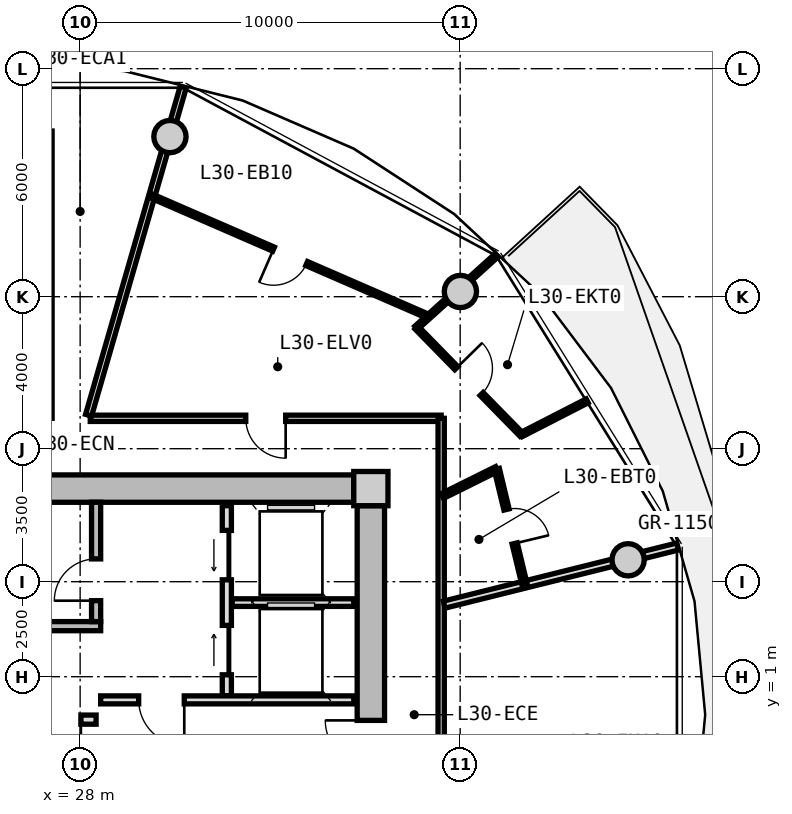
"""IFC4 building model, lengths in metres.
Left out: names, types, materials, properties, quantities, classifications, styles, units other than length and angle.
Written with IfcOpenShell. Run it as: python <this file> out.ifc"""

import sys

from ifc_helpers import new_model, si_unit, direction, frame, frame_2d, origin, origin_2d, place, context, subcontext, project, spatial, rectangle, circle, extrude, source, transform, mapped, element, fill, save


model = new_model("IFC4")
c1 = context("Model", 3, precision=1e-05, world=origin(), true_north=direction((0.0, 1.0)))
c2 = subcontext(c1, "Body", "Model", "MODEL_VIEW")
j1 = project(units=[si_unit("LENGTHUNIT", "METRE"), si_unit("PLANEANGLEUNIT", "RADIAN")], contexts=[c1])
p1 = place(None, origin())
s1 = spatial("IfcSite", under=j1, at=p1, CompositionType="ELEMENT")
p2 = place(p1, origin())
s2 = spatial("IfcBuilding", under=s1, at=p2, CompositionType="ELEMENT")
p3 = place(p2, frame((0.0, 0.0, 99.3)))
s3 = spatial("IfcBuildingStorey", under=s2, at=p3, CompositionType="ELEMENT", Elevation=99.3)
m1 = source(origin(), c2, "Body", "SweptSolid", [
    extrude(rectangle(XDim=0.9, YDim=0.9, at=origin_2d()), origin(), (0.0, 0.0, 1.0), 3.05),
])
p4 = place(p3, frame((35.65, 5.95, 0.0), z_axis=(0.0, 0.0, 1.0), x_axis=(1.0, 0.0, 0.0)))
e1 = element("IfcColumn", 1, at=p4, inside=s3, PredefinedType="COLUMN", context=c2, shape_type="MappedRepresentation", body=[
    mapped(m1, transform((0.0, 0.0, 0.0), x_axis=(1.0, 0.0, 0.0), y_axis=(0.0, 1.0, 0.0), z_axis=(0.0, 0.0, 1.0), scale=1.0)),
])
m2 = source(origin(), c2, "Body", "SweptSolid", [
    extrude(rectangle(XDim=14.4, YDim=0.72, at=frame_2d((7.2, 0.0))), origin(), (0.0, 0.0, 1.0), 2.79),
])
p5 = place(p3, frame((20.8, 5.95, 0.0), z_axis=(0.0, 0.0, 1.0), x_axis=(1.0, 0.0, 0.0)))
e2 = element("IfcWall", 2, at=p5, inside=s3, PredefinedType="SHEAR", context=c2, shape_type="MappedRepresentation", body=[
    mapped(m2, transform((0.0, 0.0, 0.0), x_axis=(1.0, 0.0, 0.0), y_axis=(0.0, 1.0, 0.0), z_axis=(0.0, 0.0, 1.0), scale=1.0)),
])
m3 = source(origin(), c2, "Body", "SweptSolid", [
    extrude(rectangle(XDim=11.0, YDim=0.72, at=frame_2d((5.5, 0.0))), origin(), (0.0, 0.0, 1.0), 2.79),
])
p6 = place(p3, frame((35.65, 5.5, 0.0), z_axis=(0.0, 0.0, 1.0), x_axis=(0.0, -1.0, 0.0)))
e3 = element("IfcWall", 3, at=p6, inside=s3, PredefinedType="SHEAR", context=c2, shape_type="MappedRepresentation", body=[
    mapped(m3, transform((0.0, 0.0, 0.0), x_axis=(1.0, 0.0, 0.0), y_axis=(0.0, 1.0, 0.0), z_axis=(0.0, 0.0, 1.0), scale=1.0)),
])
p7 = place(p6, frame((5.65, 0.0, 0.0)))
e4 = element("IfcOpeningElement", 4, at=p7, cuts=e3, PredefinedType="OPENING", context=c2, shape_type="SweptSolid", body=[
    extrude(rectangle(XDim=1.2, YDim=2.15, at=frame_2d((0.6, 1.075))), frame((0.0, 0.37, 0.0), z_axis=(0.0, -1.0, 0.0), x_axis=(1.0, 0.0, 0.0)), (0.0, 0.0, 1.0), 0.74),
])
m4 = source(origin(), c2, "Body", "SweptSolid", [
    extrude(circle(Radius=0.425, at=origin_2d()), origin(), (0.0, 0.0, 1.0), 3.05),
])
for number, where, z_axis, x_axis in (
    (5, (42.419, 4.076, 0.0), (0.0, 0.0, 1.0), (1.0, 0.0, 0.0)),
    (6, (38.006, 11.137, 0.0), (0.0, 0.0, 1.0), (1.0, 0.0, 0.0)),
    (7, (30.363, 15.213, 0.0), (0.0, 0.0, 1.0), (1.0, 0.0, 0.0)),
):
    element("IfcColumn", number, at=place(p3, frame(where, z_axis=z_axis, x_axis=x_axis)), inside=s3, PredefinedType="COLUMN", context=c2, shape_type="MappedRepresentation", body=[
        mapped(m4, transform((0.0, 0.0, 0.0), x_axis=(1.0, 0.0, 0.0), y_axis=(0.0, 1.0, 0.0), z_axis=(0.0, 0.0, 1.0), scale=1.0)),
    ])
m5 = source(origin(), c2, "Body", "SweptSolid", [
    extrude(rectangle(XDim=7.83, YDim=0.24, at=frame_2d((3.915, 0.0))), origin(), (0.0, 0.0, 1.0), 2.79),
])
p8 = place(p3, frame((20.71, 2.33, 0.0), z_axis=(0.0, 0.0, 1.0), x_axis=(1.0, 0.0, 0.0)))
e8 = element("IfcWall", 8, at=p8, inside=s3, PredefinedType="PARTITIONING", context=c2, shape_type="MappedRepresentation", body=[
    mapped(m5, transform((0.0, 0.0, 0.0), x_axis=(1.0, 0.0, 0.0), y_axis=(0.0, 1.0, 0.0), z_axis=(0.0, 0.0, 1.0), scale=1.0)),
])
m6 = source(origin(), c2, "Body", "SweptSolid", [
    extrude(rectangle(XDim=3.14, YDim=0.24, at=frame_2d((1.57, 0.0))), origin(), (0.0, 0.0, 1.0), 2.79),
])
p9 = place(p3, frame((28.42, 2.45, 0.0), z_axis=(0.0, 0.0, 1.0), x_axis=(0.0, 1.0, 0.0)))
e9 = element("IfcWall", 9, at=p9, inside=s3, PredefinedType="PARTITIONING", context=c2, shape_type="MappedRepresentation", body=[
    mapped(m6, transform((0.0, 0.0, 0.0), x_axis=(1.0, 0.0, 0.0), y_axis=(0.0, 1.0, 0.0), z_axis=(0.0, 0.0, 1.0), scale=1.0)),
])
p10 = place(p9, frame((0.55, 0.0, 0.0)))
e10 = element("IfcOpeningElement", 10, at=p10, cuts=e9, PredefinedType="OPENING", context=c2, shape_type="SweptSolid", body=[
    extrude(rectangle(XDim=1.1, YDim=2.15, at=frame_2d((0.55, 1.075))), frame((0.0, 0.13, 0.0), z_axis=(0.0, -1.0, 0.0), x_axis=(1.0, 0.0, 0.0)), (0.0, 0.0, 1.0), 0.26),
])
m7 = source(origin(), c2, "Body", "SweptSolid", [
    extrude(rectangle(XDim=5.0, YDim=0.24, at=frame_2d((2.5, 0.0))), origin(), (0.0, 0.0, 1.0), 2.775),
])
p11 = place(p3, frame((31.86, 0.5, 0.0), z_axis=(0.0, 0.0, 1.0), x_axis=(0.0, 1.0, 0.0)))
e11 = element("IfcWall", 11, at=p11, inside=s3, PredefinedType="PARTITIONING", context=c2, shape_type="MappedRepresentation", body=[
    mapped(m7, transform((0.0, 0.0, 0.0), x_axis=(1.0, 0.0, 0.0), y_axis=(0.0, 1.0, 0.0), z_axis=(0.0, 0.0, 1.0), scale=1.0)),
])
p12 = place(p11, frame((3.05, 0.0, 0.0)))
e12 = element("IfcOpeningElement", 12, at=p12, cuts=e11, PredefinedType="OPENING", context=c2, shape_type="SweptSolid", body=[
    extrude(rectangle(XDim=1.3, YDim=2.2, at=frame_2d((0.65, 1.1))), frame((0.0, 0.13, 0.0), z_axis=(0.0, -1.0, 0.0), x_axis=(1.0, 0.0, 0.0)), (0.0, 0.0, 1.0), 0.26),
])
p13 = place(p11, frame((0.55, 0.0, 0.0)))
e13 = element("IfcOpeningElement", 13, at=p13, cuts=e11, PredefinedType="OPENING", context=c2, shape_type="SweptSolid", body=[
    extrude(rectangle(XDim=1.3, YDim=2.2, at=frame_2d((0.65, 1.1))), frame((0.0, 0.13, 0.0), z_axis=(0.0, -1.0, 0.0), x_axis=(1.0, 0.0, 0.0)), (0.0, 0.0, 1.0), 0.26),
])
m8 = source(origin(), c2, "Body", "SweptSolid", [
    extrude(rectangle(XDim=3.2, YDim=0.2, at=frame_2d((1.6, 0.0))), origin(), (0.0, 0.0, 1.0), 2.775),
])
p14 = place(p3, frame((32.0, 2.95, 0.0), z_axis=(0.0, 0.0, 1.0), x_axis=(1.0, 0.0, 0.0)))
e14 = element("IfcWall", 14, at=p14, inside=s3, PredefinedType="PARTITIONING", context=c2, shape_type="MappedRepresentation", body=[
    mapped(m8, transform((0.0, 0.0, 0.0), x_axis=(1.0, 0.0, 0.0), y_axis=(0.0, 1.0, 0.0), z_axis=(0.0, 0.0, 1.0), scale=1.0)),
])
m9 = source(origin(), c2, "Body", "SweptSolid", [
    extrude(rectangle(XDim=6.66, YDim=0.21, at=frame_2d((3.33, 0.0))), origin(), (0.0, 0.0, 1.0), 2.775),
])
p15 = place(p3, frame((28.54, 0.39, 0.0), z_axis=(0.0, 0.0, 1.0), x_axis=(1.0, 0.0, 0.0)))
e15 = element("IfcWall", 15, at=p15, inside=s3, PredefinedType="PARTITIONING", context=c2, shape_type="MappedRepresentation", body=[
    mapped(m9, transform((0.0, 0.0, 0.0), x_axis=(1.0, 0.0, 0.0), y_axis=(0.0, 1.0, 0.0), z_axis=(0.0, 0.0, 1.0), scale=1.0)),
])
p16 = place(p15, frame((1.0, 0.0, 0.0)))
e16 = element("IfcOpeningElement", 16, at=p16, cuts=e15, PredefinedType="OPENING", context=c2, shape_type="SweptSolid", body=[
    extrude(rectangle(XDim=1.2, YDim=2.15, at=frame_2d((0.6, 1.075))), frame((0.0, 0.115, 0.0), z_axis=(0.0, -1.0, 0.0), x_axis=(1.0, 0.0, 0.0)), (0.0, 0.0, 1.0), 0.23),
])
m10 = source(origin(), c2, "Body", "SweptSolid", [
    extrude(rectangle(XDim=7.62, YDim=0.24, at=frame_2d((3.81, 0.0))), origin(), (0.0, 0.0, 1.0), 2.775),
])
p17 = place(p3, frame((20.8, -0.13, 0.0), z_axis=(0.0, 0.0, 1.0), x_axis=(1.0, 0.0, 0.0)))
e17 = element("IfcWall", 17, at=p17, inside=s3, PredefinedType="PARTITIONING", context=c2, shape_type="MappedRepresentation", body=[
    mapped(m10, transform((0.0, 0.0, 0.0), x_axis=(1.0, 0.0, 0.0), y_axis=(0.0, 1.0, 0.0), z_axis=(0.0, 0.0, 1.0), scale=1.0)),
])
p18 = place(p17, frame((6.22, 0.0, 0.0)))
e18 = element("IfcOpeningElement", 18, at=p18, cuts=e17, PredefinedType="OPENING", context=c2, shape_type="SweptSolid", body=[
    extrude(rectangle(XDim=1.0, YDim=2.1, at=frame_2d((0.5, 1.05))), frame((0.0, 0.13, 0.0), z_axis=(0.0, -1.0, 0.0), x_axis=(1.0, 0.0, 0.0)), (0.0, 0.0, 1.0), 0.26),
])
p19 = place(p17, frame((2.4, 0.0, 0.0)))
e19 = element("IfcOpeningElement", 19, at=p19, cuts=e17, PredefinedType="OPENING", context=c2, shape_type="SweptSolid", body=[
    extrude(rectangle(XDim=1.0, YDim=2.1, at=frame_2d((0.5, 1.05))), frame((0.0, 0.13, 0.0), z_axis=(0.0, -1.0, 0.0), x_axis=(1.0, 0.0, 0.0)), (0.0, 0.0, 1.0), 0.26),
])
m11 = source(origin(), c2, "Body", "SweptSolid", [
    extrude(rectangle(XDim=9.234, YDim=0.165, at=frame_2d((4.617, 0.0))), origin(), (0.0, 0.0, 1.0), 2.775),
])
p20 = place(p3, frame((28.266, 7.8, 0.0), z_axis=(0.0, 0.0, 1.0), x_axis=(1.0, 0.0, 0.0)))
e20 = element("IfcWall", 20, at=p20, inside=s3, PredefinedType="PARTITIONING", context=c2, shape_type="MappedRepresentation", body=[
    mapped(m11, transform((0.0, 0.0, 0.0), x_axis=(1.0, 0.0, 0.0), y_axis=(0.0, 1.0, 0.0), z_axis=(0.0, 0.0, 1.0), scale=1.0)),
])
p21 = place(p20, frame((4.092, 0.0, 0.0)))
e21 = element("IfcOpeningElement", 21, at=p21, cuts=e20, PredefinedType="OPENING", context=c2, shape_type="SweptSolid", body=[
    extrude(rectangle(XDim=1.05, YDim=2.15, at=frame_2d((0.525, 1.075))), frame((0.0, 0.093, 0.0), z_axis=(0.0, -1.0, 0.0), x_axis=(1.0, 0.0, 0.0)), (0.0, 0.0, 1.0), 0.185),
])
m12 = source(origin(), c2, "Body", "SweptSolid", [
    extrude(rectangle(XDim=15.6, YDim=0.165, at=frame_2d((7.8, 0.0))), origin(), (0.0, 0.0, 1.0), 2.775),
])
p22 = place(p3, frame((37.5, 7.8, 0.0), z_axis=(0.0, 0.0, 1.0), x_axis=(0.0, -1.0, 0.0)))
e22 = element("IfcWall", 22, at=p22, inside=s3, PredefinedType="PARTITIONING", context=c2, shape_type="MappedRepresentation", body=[
    mapped(m12, transform((0.0, 0.0, 0.0), x_axis=(1.0, 0.0, 0.0), y_axis=(0.0, 1.0, 0.0), z_axis=(0.0, 0.0, 1.0), scale=1.0)),
])
p23 = place(p22, frame((9.482, 0.0, 0.0)))
e23 = element("IfcOpeningElement", 23, at=p23, cuts=e22, PredefinedType="OPENING", context=c2, shape_type="SweptSolid", body=[
    extrude(rectangle(XDim=1.25, YDim=2.2, at=frame_2d((0.625, 1.1))), frame((0.0, 0.093, 0.0), z_axis=(0.0, -1.0, 0.0), x_axis=(1.0, 0.0, 0.0)), (0.0, 0.0, 1.0), 0.185),
])
m13 = source(origin(), c2, "Body", "SweptSolid", [
    extrude(rectangle(XDim=8.989, YDim=0.165, at=frame_2d((4.495, 0.0))), origin(), (0.0, 0.0, 1.0), 2.275),
])
p24 = place(p3, frame((28.222, 7.88, 0.0), z_axis=(0.0, 0.0, 1.0), x_axis=(0.27702323008, 0.960863221274, 0.0)))
e24 = element("IfcWall", 24, at=p24, inside=s3, PredefinedType="PARTITIONING", context=c2, shape_type="MappedRepresentation", body=[
    mapped(m13, transform((0.0, 0.0, 0.0), x_axis=(1.0, 0.0, 0.0), y_axis=(0.0, 1.0, 0.0), z_axis=(0.0, 0.0, 1.0), scale=1.0)),
])
m14 = source(origin(), c2, "Body", "SweptSolid", [
    extrude(rectangle(XDim=6.331, YDim=0.19, at=frame_2d((3.165, 0.0))), origin(), (0.0, 0.0, 1.0), 2.275),
])
p25 = place(p3, frame((37.58, 2.896, 0.0), z_axis=(0.0, 0.0, 1.0), x_axis=(0.97036440661, 0.241646267062, 0.0)))
e25 = element("IfcWall", 25, at=p25, inside=s3, PredefinedType="PARTITIONING", context=c2, shape_type="MappedRepresentation", body=[
    mapped(m14, transform((0.0, 0.0, 0.0), x_axis=(1.0, 0.0, 0.0), y_axis=(0.0, 1.0, 0.0), z_axis=(0.0, 0.0, 1.0), scale=1.0)),
])
m15 = source(origin(), c2, "Body", "SweptSolid", [
    extrude(rectangle(XDim=7.938, YDim=0.115, at=frame_2d((3.969, 0.0))), origin(), (0.0, 0.0, 1.0), 2.775),
])
p26 = place(p3, frame((37.164, 10.479, 0.0), z_axis=(0.0, 0.0, 1.0), x_axis=(-0.917052940979, 0.398765474235, 0.0)))
e26 = element("IfcWall", 26, at=p26, inside=s3, PredefinedType="PARTITIONING", context=c2, shape_type="MappedRepresentation", body=[
    mapped(m15, transform((0.0, 0.0, 0.0), x_axis=(1.0, 0.0, 0.0), y_axis=(0.0, 1.0, 0.0), z_axis=(0.0, 0.0, 1.0), scale=1.0)),
])
p27 = place(p26, frame((3.494, 0.0, 0.0)))
e27 = element("IfcOpeningElement", 27, at=p27, cuts=e26, PredefinedType="OPENING", context=c2, shape_type="SweptSolid", body=[
    extrude(rectangle(XDim=0.95, YDim=2.1, at=frame_2d((0.475, 1.05))), frame((0.0, 0.067, 0.0), z_axis=(0.0, -1.0, 0.0), x_axis=(1.0, 0.0, 0.0)), (0.0, 0.0, 1.0), 0.135),
])
m16 = source(origin(), c2, "Body", "SweptSolid", [
    extrude(rectangle(XDim=2.852, YDim=0.115, at=frame_2d((1.426, 0.0))), origin(), (0.0, 0.0, 1.0), 2.275),
])
p28 = place(p3, frame((36.844, 10.18, 0.0), z_axis=(0.0, 0.0, 1.0), x_axis=(0.742190556634, 0.670188911908, 0.0)))
e28 = element("IfcWall", 28, at=p28, inside=s3, PredefinedType="PARTITIONING", context=c2, shape_type="MappedRepresentation", body=[
    mapped(m16, transform((0.0, 0.0, 0.0), x_axis=(1.0, 0.0, 0.0), y_axis=(0.0, 1.0, 0.0), z_axis=(0.0, 0.0, 1.0), scale=1.0)),
])
m17 = source(origin(), c2, "Body", "SweptSolid", [
    extrude(rectangle(XDim=1.6, YDim=0.14, at=frame_2d((0.8, 0.0))), origin(), (0.0, 0.0, 1.0), 2.775),
])
p29 = place(p3, frame((37.53, 5.754, 0.0), z_axis=(0.0, 0.0, 1.0), x_axis=(0.895522919837, 0.445015393044, 0.0)))
e29 = element("IfcWall", 29, at=p29, inside=s3, PredefinedType="PARTITIONING", context=c2, shape_type="MappedRepresentation", body=[
    mapped(m17, transform((0.0, 0.0, 0.0), x_axis=(1.0, 0.0, 0.0), y_axis=(0.0, 1.0, 0.0), z_axis=(0.0, 0.0, 1.0), scale=1.0)),
])
m18 = source(origin(), c2, "Body", "SweptSolid", [
    extrude(rectangle(XDim=3.112, YDim=0.14, at=frame_2d((1.556, 0.0))), origin(), (0.0, 0.0, 1.0), 2.415),
])
p30 = place(p3, frame((38.963, 6.466, 0.0), z_axis=(0.0, 0.0, 1.0), x_axis=(0.233737944029, -0.972299631555, 0.0)))
e30 = element("IfcWall", 30, at=p30, inside=s3, PredefinedType="PARTITIONING", context=c2, shape_type="MappedRepresentation", body=[
    mapped(m18, transform((0.0, 0.0, 0.0), x_axis=(1.0, 0.0, 0.0), y_axis=(0.0, 1.0, 0.0), z_axis=(0.0, 0.0, 1.0), scale=1.0)),
])
p31 = place(p30, frame((1.096, 0.0, 0.0)))
e31 = element("IfcOpeningElement", 31, at=p31, cuts=e30, PredefinedType="OPENING", context=c2, shape_type="SweptSolid", body=[
    extrude(rectangle(XDim=0.92, YDim=2.1, at=frame_2d((0.46, 1.05))), frame((0.0, 0.08, 0.0), z_axis=(0.0, -1.0, 0.0), x_axis=(1.0, 0.0, 0.0)), (0.0, 0.0, 1.0), 0.16),
])
m19 = source(origin(), c2, "Body", "SweptSolid", [
    extrude(rectangle(XDim=1.945, YDim=0.115, at=frame_2d((0.973, 0.0))), origin(), (0.0, 0.0, 1.0), 2.775),
])
p32 = place(p3, frame((39.611, 7.37, 0.0), z_axis=(0.0, 0.0, 1.0), x_axis=(0.889684148329, 0.456576517368, 0.0)))
e32 = element("IfcWall", 32, at=p32, inside=s3, PredefinedType="PARTITIONING", context=c2, shape_type="MappedRepresentation", body=[
    mapped(m19, transform((0.0, 0.0, 0.0), x_axis=(1.0, 0.0, 0.0), y_axis=(0.0, 1.0, 0.0), z_axis=(0.0, 0.0, 1.0), scale=1.0)),
])
m20 = source(origin(), c2, "Body", "SweptSolid", [
    extrude(rectangle(XDim=3.943, YDim=0.115, at=frame_2d((1.972, 0.0))), origin(), (0.0, 0.0, 1.0), 2.775),
])
p33 = place(p3, frame((39.611, 7.37, 0.0), z_axis=(0.0, 0.0, 1.0), x_axis=(-0.699481885754, 0.714650328134, 0.0)))
e33 = element("IfcWall", 33, at=p33, inside=s3, PredefinedType="PARTITIONING", context=c2, shape_type="MappedRepresentation", body=[
    mapped(m20, transform((0.0, 0.0, 0.0), x_axis=(1.0, 0.0, 0.0), y_axis=(0.0, 1.0, 0.0), z_axis=(0.0, 0.0, 1.0), scale=1.0)),
])
p34 = place(p33, frame((1.497, 0.0, 0.0)))
e34 = element("IfcOpeningElement", 34, at=p34, cuts=e33, PredefinedType="OPENING", context=c2, shape_type="SweptSolid", body=[
    extrude(rectangle(XDim=0.95, YDim=2.1, at=frame_2d((0.475, 1.05))), frame((0.0, 0.067, 0.0), z_axis=(0.0, -1.0, 0.0), x_axis=(1.0, 0.0, 0.0)), (0.0, 0.0, 1.0), 0.135),
])
m21 = source(origin(), c2, "Body", "SweptSolid", [
    extrude(rectangle(XDim=1.1, YDim=2.15, at=frame_2d((0.55, 1.075))), frame((0.0, 0.025, 0.0), z_axis=(0.0, -1.0, 0.0), x_axis=(1.0, 0.0, 0.0)), (0.0, 0.0, 1.0), 0.05),
])
p35 = place(p10, origin())
e35 = element("IfcDoor", 35, at=p35, inside=s3, OperationType="SINGLE_SWING_LEFT", PredefinedType="DOOR", context=c2, shape_type="MappedRepresentation", body=[
    mapped(m21, transform((0.0, 0.0, 0.0), x_axis=(1.0, 0.0, 0.0), y_axis=(0.0, 1.0, 0.0), z_axis=(0.0, 0.0, 1.0), scale=1.0)),
])
fill(e10, e35)
m22 = source(origin(), c2, "Body", "SweptSolid", [
    extrude(rectangle(XDim=1.3, YDim=2.2, at=frame_2d((0.65, 1.1))), frame((0.0, 0.025, 0.0), z_axis=(0.0, -1.0, 0.0), x_axis=(1.0, 0.0, 0.0)), (0.0, 0.0, 1.0), 0.05),
])
p36 = place(p12, origin())
e36 = element("IfcDoor", 36, at=p36, inside=s3, OperationType="SLIDING_TO_LEFT", PredefinedType="DOOR", context=c2, shape_type="MappedRepresentation", body=[
    mapped(m22, transform((0.0, 0.0, 0.0), x_axis=(1.0, 0.0, 0.0), y_axis=(0.0, 1.0, 0.0), z_axis=(0.0, 0.0, 1.0), scale=1.0)),
])
fill(e12, e36)
p37 = place(p13, origin())
e37 = element("IfcDoor", 37, at=p37, inside=s3, OperationType="SLIDING_TO_RIGHT", PredefinedType="DOOR", context=c2, shape_type="MappedRepresentation", body=[
    mapped(m22, transform((0.0, 0.0, 0.0), x_axis=(1.0, 0.0, 0.0), y_axis=(0.0, 1.0, 0.0), z_axis=(0.0, 0.0, 1.0), scale=1.0)),
])
fill(e13, e37)
m23 = source(origin(), c2, "Body", "SweptSolid", [
    extrude(rectangle(XDim=1.2, YDim=2.15, at=frame_2d((0.6, 1.075))), frame((0.0, 0.025, 0.0), z_axis=(0.0, -1.0, 0.0), x_axis=(1.0, 0.0, 0.0)), (0.0, 0.0, 1.0), 0.05),
])
p38 = place(p16, frame((1.2, 0.0, 0.0), z_axis=(0.0, 0.0, 1.0), x_axis=(-1.0, 0.0, 0.0)))
e38 = element("IfcDoor", 38, at=p38, inside=s3, OperationType="SINGLE_SWING_LEFT", PredefinedType="DOOR", context=c2, shape_type="MappedRepresentation", body=[
    mapped(m23, transform((0.0, 0.0, 0.0), x_axis=(1.0, 0.0, 0.0), y_axis=(0.0, 1.0, 0.0), z_axis=(0.0, 0.0, 1.0), scale=1.0)),
])
fill(e16, e38)
p39 = place(p7, frame((1.2, 0.0, 0.0), z_axis=(0.0, 0.0, 1.0), x_axis=(-1.0, 0.0, 0.0)))
e39 = element("IfcDoor", 39, at=p39, inside=s3, OperationType="SINGLE_SWING_RIGHT", PredefinedType="DOOR", context=c2, shape_type="MappedRepresentation", body=[
    mapped(m23, transform((0.0, 0.0, 0.0), x_axis=(1.0, 0.0, 0.0), y_axis=(0.0, 1.0, 0.0), z_axis=(0.0, 0.0, 1.0), scale=1.0)),
])
fill(e4, e39)
m24 = source(origin(), c2, "Body", "SweptSolid", [
    extrude(rectangle(XDim=1.0, YDim=2.1, at=frame_2d((0.5, 1.05))), frame((0.0, 0.025, 0.0), z_axis=(0.0, -1.0, 0.0), x_axis=(1.0, 0.0, 0.0)), (0.0, 0.0, 1.0), 0.05),
])
p40 = place(p18, frame((1.0, 0.0, 0.0), z_axis=(0.0, 0.0, 1.0), x_axis=(-1.0, 0.0, 0.0)))
e40 = element("IfcDoor", 40, at=p40, inside=s3, OperationType="SINGLE_SWING_LEFT", PredefinedType="DOOR", context=c2, shape_type="MappedRepresentation", body=[
    mapped(m24, transform((0.0, 0.0, 0.0), x_axis=(1.0, 0.0, 0.0), y_axis=(0.0, 1.0, 0.0), z_axis=(0.0, 0.0, 1.0), scale=1.0)),
])
fill(e18, e40)
m25 = source(origin(), c2, "Body", "SweptSolid", [
    extrude(rectangle(XDim=1.05, YDim=2.15, at=frame_2d((0.525, 1.075))), frame((0.0, 0.025, 0.0), z_axis=(0.0, -1.0, 0.0), x_axis=(1.0, 0.0, 0.0)), (0.0, 0.0, 1.0), 0.05),
])
p41 = place(p21, frame((1.05, 0.0, 0.0), z_axis=(0.0, 0.0, 1.0), x_axis=(-1.0, 0.0, 0.0)))
e41 = element("IfcDoor", 41, at=p41, inside=s3, OperationType="SINGLE_SWING_LEFT", PredefinedType="DOOR", context=c2, shape_type="MappedRepresentation", body=[
    mapped(m25, transform((0.0, 0.0, 0.0), x_axis=(1.0, 0.0, 0.0), y_axis=(0.0, 1.0, 0.0), z_axis=(0.0, 0.0, 1.0), scale=1.0)),
])
fill(e21, e41)
m26 = source(origin(), c2, "Body", "SweptSolid", [
    extrude(rectangle(XDim=0.92, YDim=2.1, at=frame_2d((0.46, 1.05))), frame((0.0, 0.025, 0.0), z_axis=(0.0, -1.0, 0.0), x_axis=(1.0, 0.0, 0.0)), (0.0, 0.0, 1.0), 0.05),
])
p42 = place(p31, origin())
e42 = element("IfcDoor", 42, at=p42, inside=s3, OperationType="SINGLE_SWING_RIGHT", PredefinedType="DOOR", context=c2, shape_type="MappedRepresentation", body=[
    mapped(m26, transform((0.0, 0.0, 0.0), x_axis=(1.0, 0.0, 0.0), y_axis=(0.0, 1.0, 0.0), z_axis=(0.0, 0.0, 1.0), scale=1.0)),
])
fill(e31, e42)
m27 = source(origin(), c2, "Body", "SweptSolid", [
    extrude(rectangle(XDim=0.95, YDim=2.1, at=frame_2d((0.475, 1.05))), frame((0.0, 0.025, 0.0), z_axis=(0.0, -1.0, 0.0), x_axis=(1.0, 0.0, 0.0)), (0.0, 0.0, 1.0), 0.05),
])
p43 = place(p34, frame((0.95, 0.0, 0.0), z_axis=(0.0, 0.0, 1.0), x_axis=(-1.0, 0.0, 0.0)))
e43 = element("IfcDoor", 43, at=p43, inside=s3, OperationType="SINGLE_SWING_LEFT", PredefinedType="DOOR", context=c2, shape_type="MappedRepresentation", body=[
    mapped(m27, transform((0.0, 0.0, 0.0), x_axis=(1.0, 0.0, 0.0), y_axis=(0.0, 1.0, 0.0), z_axis=(0.0, 0.0, 1.0), scale=1.0)),
])
fill(e34, e43)
p44 = place(p27, origin())
e44 = element("IfcDoor", 44, at=p44, inside=s3, OperationType="SINGLE_SWING_RIGHT", PredefinedType="DOOR", context=c2, shape_type="MappedRepresentation", body=[
    mapped(m27, transform((0.0, 0.0, 0.0), x_axis=(1.0, 0.0, 0.0), y_axis=(0.0, 1.0, 0.0), z_axis=(0.0, 0.0, 1.0), scale=1.0)),
])
fill(e27, e44)
save(model, sys.argv[1])
